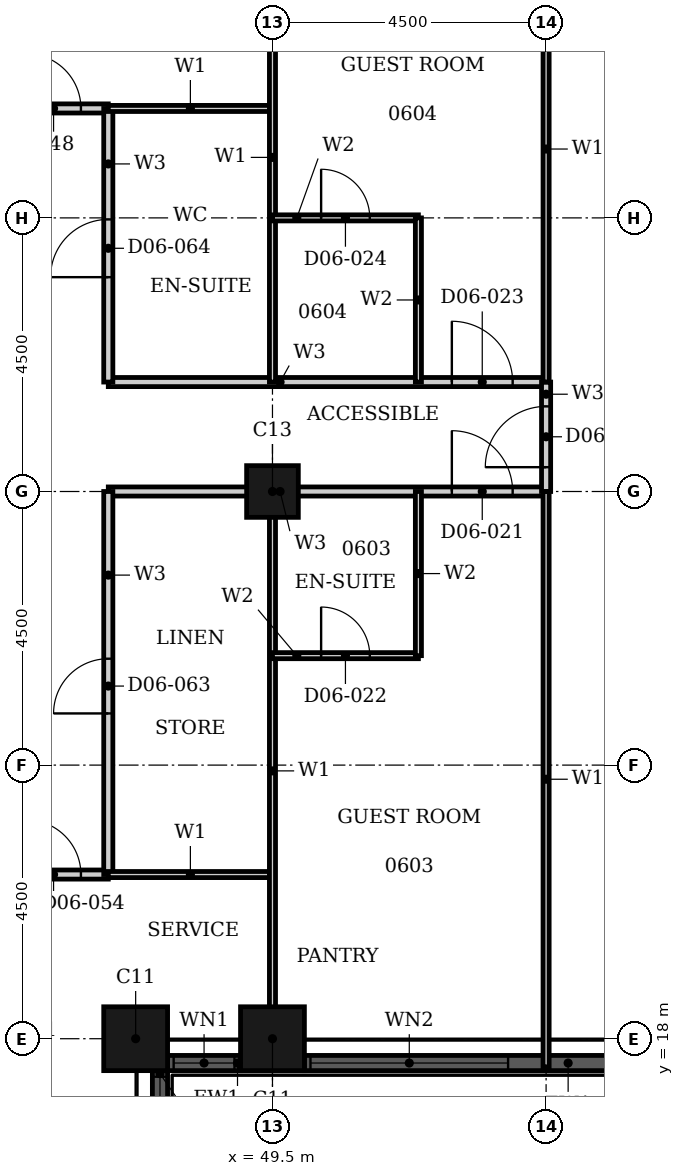
"""IFC4 building model, lengths in metres.
Left out: names, types, materials, properties, quantities, classifications, styles, units other than length and angle.
Written with IfcOpenShell. Run it as: python <this file> out.ifc"""

import sys

from ifc_helpers import new_model, si_unit, direction, frame, frame_2d, origin, origin_2d, place, context, subcontext, project, spatial, rectangle, hollow_rectangle, extrude, element, fill, save


model = new_model("IFC4")
c1 = context("Model", 3, precision=1e-05, world=origin(), true_north=direction((0.0, 1.0)))
c2 = subcontext(c1, "Body", "Model", "MODEL_VIEW")
j1 = project(units=[si_unit("LENGTHUNIT", "METRE"), si_unit("PLANEANGLEUNIT", "RADIAN")], contexts=[c1])
p1 = place(None, origin())
s1 = spatial("IfcSite", under=j1, at=p1, CompositionType="ELEMENT")
p2 = place(p1, origin())
s2 = spatial("IfcBuilding", under=s1, at=p2, CompositionType="ELEMENT")
p3 = place(p2, frame((0.0, 0.0, 33.6)))
s3 = spatial("IfcBuildingStorey", under=s2, at=p3, CompositionType="ELEMENT", Elevation=33.6)
for number, where, z_axis, x_axis in (
    (1, (47.25, 18.0, 0.0), (0.0, 0.0, 1.0), (1.0, 0.0, 0.0)),
    (2, (49.5, 18.0, 0.0), (0.0, 0.0, 1.0), (1.0, 0.0, 0.0)),
):
    element("IfcColumn", number, at=place(p3, frame(where, z_axis=z_axis, x_axis=x_axis)), inside=s3, PredefinedType="COLUMN", context=c2, shape_type="SweptSolid", body=[
        extrude(hollow_rectangle(XDim=1.05, YDim=1.05, WallThickness=0.034, at=origin_2d()), origin(), (0.0, 0.0, 1.0), 3.6),
    ])
p4 = place(p3, frame((49.5, 27.0, 0.0), z_axis=(0.0, 0.0, 1.0), x_axis=(1.0, 0.0, 0.0)))
e3 = element("IfcColumn", 3, at=p4, inside=s3, PredefinedType="COLUMN", context=c2, shape_type="SweptSolid", body=[
    extrude(hollow_rectangle(XDim=0.85, YDim=0.85, WallThickness=0.026, at=origin_2d()), origin(), (0.0, 0.0, 1.0), 3.6),
])
p5 = place(p3, frame((47.65, 16.275, 0.0), z_axis=(0.0, 0.0, 1.0), x_axis=(0.0, 1.0, 0.0)))
e4 = element("IfcWall", 4, at=p5, inside=s3, PredefinedType="SOLIDWALL", context=c2, shape_type="SweptSolid", body=[
    extrude(rectangle(XDim=1.2, YDim=0.25, at=frame_2d((0.6, 0.0))), origin(), (0.0, 0.0, 1.0), 3.6),
])
p6 = place(p5, frame((0.1, 0.0, 0.9)))
e5 = element("IfcOpeningElement", 5, at=p6, cuts=e4, PredefinedType="OPENING", context=c2, shape_type="SweptSolid", body=[
    extrude(rectangle(XDim=1.0, YDim=2.08, at=frame_2d((0.5, 1.04))), frame((0.0, 0.135, 0.0), z_axis=(0.0, -1.0, 0.0), x_axis=(1.0, 0.0, 0.0)), (0.0, 0.0, 1.0), 0.27),
])
p7 = place(p3, frame((47.775, 17.6, 0.0), z_axis=(0.0, 0.0, 1.0), x_axis=(1.0, 0.0, 0.0)))
e6 = element("IfcWall", 6, at=p7, inside=s3, PredefinedType="SOLIDWALL", context=c2, shape_type="SweptSolid", body=[
    extrude(rectangle(XDim=1.2, YDim=0.25, at=frame_2d((0.6, 0.0))), origin(), (0.0, 0.0, 1.0), 3.6),
])
p8 = place(p7, frame((0.1, 0.0, 0.9)))
e7 = element("IfcOpeningElement", 7, at=p8, cuts=e6, PredefinedType="OPENING", context=c2, shape_type="SweptSolid", body=[
    extrude(rectangle(XDim=1.0, YDim=2.08, at=frame_2d((0.5, 1.04))), frame((0.0, 0.135, 0.0), z_axis=(0.0, -1.0, 0.0), x_axis=(1.0, 0.0, 0.0)), (0.0, 0.0, 1.0), 0.27),
])
p9 = place(p3, frame((50.025, 17.6, 0.0), z_axis=(0.0, 0.0, 1.0), x_axis=(1.0, 0.0, 0.0)))
e8 = element("IfcWall", 8, at=p9, inside=s3, PredefinedType="SOLIDWALL", context=c2, shape_type="SweptSolid", body=[
    extrude(rectangle(XDim=7.95, YDim=0.25, at=frame_2d((3.975, 0.0))), origin(), (0.0, 0.0, 1.0), 3.6),
])
p10 = place(p9, frame((0.1, 0.0, 0.9)))
e9 = element("IfcOpeningElement", 9, at=p10, cuts=e8, PredefinedType="OPENING", context=c2, shape_type="SweptSolid", body=[
    extrude(rectangle(XDim=3.25, YDim=2.08, at=frame_2d((1.625, 1.04))), frame((0.0, 0.135, 0.0), z_axis=(0.0, -1.0, 0.0), x_axis=(1.0, 0.0, 0.0)), (0.0, 0.0, 1.0), 0.27),
])
p11 = place(p9, frame((5.325, 0.0, 0.0)))
e10 = element("IfcOpeningElement", 10, at=p11, cuts=e8, PredefinedType="OPENING", context=c2, shape_type="SweptSolid", body=[
    extrude(rectangle(XDim=1.8, YDim=2.4, at=frame_2d((0.9, 1.2))), frame((0.0, 0.135, 0.0), z_axis=(0.0, -1.0, 0.0), x_axis=(1.0, 0.0, 0.0)), (0.0, 0.0, 1.0), 0.27),
])
p12 = place(p3, frame((31.5, 20.7, 0.0), z_axis=(0.0, 0.0, 1.0), x_axis=(1.0, 0.0, 0.0)))
e11 = element("IfcWall", 11, at=p12, inside=s3, PredefinedType="PARTITIONING", context=c2, shape_type="SweptSolid", body=[
    extrude(rectangle(XDim=15.3, YDim=0.15, at=frame_2d((7.65, 0.0))), origin(), (0.0, 0.0, 1.0), 3.3),
])
p13 = place(p12, frame((11.95, 0.0, 0.0)))
e12 = element("IfcOpeningElement", 12, at=p13, cuts=e11, PredefinedType="OPENING", context=c2, shape_type="SweptSolid", body=[
    extrude(rectangle(XDim=1.0, YDim=2.1, at=frame_2d((0.5, 1.05))), frame((0.0, 0.085, 0.0), z_axis=(0.0, -1.0, 0.0), x_axis=(1.0, 0.0, 0.0)), (0.0, 0.0, 1.0), 0.17),
])
p14 = place(p12, frame((13.95, 0.0, 0.0)))
e13 = element("IfcOpeningElement", 13, at=p14, cuts=e11, PredefinedType="OPENING", context=c2, shape_type="SweptSolid", body=[
    extrude(rectangle(XDim=0.9, YDim=2.1, at=frame_2d((0.45, 1.05))), frame((0.0, 0.085, 0.0), z_axis=(0.0, -1.0, 0.0), x_axis=(1.0, 0.0, 0.0)), (0.0, 0.0, 1.0), 0.17),
])
p15 = place(p12, frame((4.05, 0.0, 0.0)))
e14 = element("IfcOpeningElement", 14, at=p15, cuts=e11, PredefinedType="OPENING", context=c2, shape_type="SweptSolid", body=[
    extrude(rectangle(XDim=0.9, YDim=2.1, at=frame_2d((0.45, 1.05))), frame((0.0, 0.085, 0.0), z_axis=(0.0, -1.0, 0.0), x_axis=(1.0, 0.0, 0.0)), (0.0, 0.0, 1.0), 0.17),
])
p16 = place(p3, frame((46.8, 27.0, 0.0), z_axis=(0.0, 0.0, 1.0), x_axis=(1.0, 0.0, 0.0)))
e15 = element("IfcWall", 15, at=p16, inside=s3, PredefinedType="PARTITIONING", context=c2, shape_type="SweptSolid", body=[
    extrude(rectangle(XDim=7.2, YDim=0.15, at=frame_2d((3.6, 0.0))), origin(), (0.0, 0.0, 1.0), 2.58),
])
p17 = place(p16, frame((5.65, 0.0, 0.0)))
e16 = element("IfcOpeningElement", 16, at=p17, cuts=e15, PredefinedType="OPENING", context=c2, shape_type="SweptSolid", body=[
    extrude(rectangle(XDim=1.0, YDim=2.1, at=frame_2d((0.5, 1.05))), frame((0.0, 0.085, 0.0), z_axis=(0.0, -1.0, 0.0), x_axis=(1.0, 0.0, 0.0)), (0.0, 0.0, 1.0), 0.17),
])
p18 = place(p3, frame((46.8, 28.8, 0.0), z_axis=(0.0, 0.0, 1.0), x_axis=(1.0, 0.0, 0.0)))
e17 = element("IfcWall", 17, at=p18, inside=s3, PredefinedType="PARTITIONING", context=c2, shape_type="SweptSolid", body=[
    extrude(rectangle(XDim=7.2, YDim=0.15, at=frame_2d((3.6, 0.0))), origin(), (0.0, 0.0, 1.0), 3.3),
])
p19 = place(p18, frame((5.65, 0.0, 0.0)))
e18 = element("IfcOpeningElement", 18, at=p19, cuts=e17, PredefinedType="OPENING", context=c2, shape_type="SweptSolid", body=[
    extrude(rectangle(XDim=1.0, YDim=2.1, at=frame_2d((0.5, 1.05))), frame((0.0, 0.085, 0.0), z_axis=(0.0, -1.0, 0.0), x_axis=(1.0, 0.0, 0.0)), (0.0, 0.0, 1.0), 0.17),
])
p20 = place(p3, frame((33.3, 33.3, 0.0), z_axis=(0.0, 0.0, 1.0), x_axis=(1.0, 0.0, 0.0)))
e19 = element("IfcWall", 19, at=p20, inside=s3, PredefinedType="PARTITIONING", context=c2, shape_type="SweptSolid", body=[
    extrude(rectangle(XDim=13.5, YDim=0.15, at=frame_2d((6.75, 0.0))), origin(), (0.0, 0.0, 1.0), 3.3),
])
p21 = place(p20, frame((10.15, 0.0, 0.0)))
e20 = element("IfcOpeningElement", 20, at=p21, cuts=e19, PredefinedType="OPENING", context=c2, shape_type="SweptSolid", body=[
    extrude(rectangle(XDim=1.0, YDim=2.1, at=frame_2d((0.5, 1.05))), frame((0.0, 0.085, 0.0), z_axis=(0.0, -1.0, 0.0), x_axis=(1.0, 0.0, 0.0)), (0.0, 0.0, 1.0), 0.17),
])
p22 = place(p20, frame((12.15, 0.0, 0.0)))
e21 = element("IfcOpeningElement", 21, at=p22, cuts=e19, PredefinedType="OPENING", context=c2, shape_type="SweptSolid", body=[
    extrude(rectangle(XDim=0.9, YDim=2.1, at=frame_2d((0.45, 1.05))), frame((0.0, 0.085, 0.0), z_axis=(0.0, -1.0, 0.0), x_axis=(1.0, 0.0, 0.0)), (0.0, 0.0, 1.0), 0.17),
])
p23 = place(p20, frame((0.75, 0.0, 0.0)))
e22 = element("IfcOpeningElement", 22, at=p23, cuts=e19, PredefinedType="OPENING", context=c2, shape_type="SweptSolid", body=[
    extrude(rectangle(XDim=0.9, YDim=2.1, at=frame_2d((0.45, 1.05))), frame((0.0, 0.085, 0.0), z_axis=(0.0, -1.0, 0.0), x_axis=(1.0, 0.0, 0.0)), (0.0, 0.0, 1.0), 0.17),
])
p24 = place(p20, frame((4.35, 0.0, 0.0)))
e23 = element("IfcOpeningElement", 23, at=p24, cuts=e19, PredefinedType="OPENING", context=c2, shape_type="SweptSolid", body=[
    extrude(rectangle(XDim=0.9, YDim=2.1, at=frame_2d((0.45, 1.05))), frame((0.0, 0.085, 0.0), z_axis=(0.0, -1.0, 0.0), x_axis=(1.0, 0.0, 0.0)), (0.0, 0.0, 1.0), 0.17),
])
p25 = place(p3, frame((46.8, 28.8, 0.0), z_axis=(0.0, 0.0, 1.0), x_axis=(0.0, 1.0, 0.0)))
e24 = element("IfcWall", 24, at=p25, inside=s3, PredefinedType="PARTITIONING", context=c2, shape_type="SweptSolid", body=[
    extrude(rectangle(XDim=4.5, YDim=0.15, at=frame_2d((2.25, 0.0))), origin(), (0.0, 0.0, 1.0), 3.3),
])
p26 = place(p25, frame((1.725, 0.0, 0.0)))
e25 = element("IfcOpeningElement", 25, at=p26, cuts=e24, PredefinedType="OPENING", context=c2, shape_type="SweptSolid", body=[
    extrude(rectangle(XDim=0.95, YDim=2.1, at=frame_2d((0.475, 1.05))), frame((0.0, 0.085, 0.0), z_axis=(0.0, -1.0, 0.0), x_axis=(1.0, 0.0, 0.0)), (0.0, 0.0, 1.0), 0.17),
])
p27 = place(p3, frame((46.8, 20.7, 0.0), z_axis=(0.0, 0.0, 1.0), x_axis=(0.0, 1.0, 0.0)))
e26 = element("IfcWall", 26, at=p27, inside=s3, PredefinedType="PARTITIONING", context=c2, shape_type="SweptSolid", body=[
    extrude(rectangle(XDim=6.3, YDim=0.15, at=frame_2d((3.15, 0.0))), origin(), (0.0, 0.0, 1.0), 3.3),
])
p28 = place(p27, frame((2.65, 0.0, 0.0)))
e27 = element("IfcOpeningElement", 27, at=p28, cuts=e26, PredefinedType="OPENING", context=c2, shape_type="SweptSolid", body=[
    extrude(rectangle(XDim=0.9, YDim=2.1, at=frame_2d((0.45, 1.05))), frame((0.0, 0.085, 0.0), z_axis=(0.0, -1.0, 0.0), x_axis=(1.0, 0.0, 0.0)), (0.0, 0.0, 1.0), 0.17),
])
p29 = place(p3, frame((54.0, 27.0, 0.0), z_axis=(0.0, 0.0, 1.0), x_axis=(0.0, 1.0, 0.0)))
e28 = element("IfcWall", 28, at=p29, inside=s3, PredefinedType="PARTITIONING", context=c2, shape_type="SweptSolid", body=[
    extrude(rectangle(XDim=1.8, YDim=0.15, at=frame_2d((0.9, 0.0))), origin(), (0.0, 0.0, 1.0), 3.3),
])
p30 = place(p29, frame((0.4, 0.0, 0.0)))
e29 = element("IfcOpeningElement", 29, at=p30, cuts=e28, PredefinedType="OPENING", context=c2, shape_type="SweptSolid", body=[
    extrude(rectangle(XDim=1.0, YDim=2.1, at=frame_2d((0.5, 1.05))), frame((0.0, 0.085, 0.0), z_axis=(0.0, -1.0, 0.0), x_axis=(1.0, 0.0, 0.0)), (0.0, 0.0, 1.0), 0.17),
])
for number, where, z_axis, x_axis in (
    (30, (46.8, 20.7, 0.0), (0.0, 0.0, 1.0), (1.0, 0.0, 0.0)),
    (31, (46.8, 33.3, 0.0), (0.0, 0.0, 1.0), (1.0, 0.0, 0.0)),
):
    element("IfcWall", number, at=place(p3, frame(where, z_axis=z_axis, x_axis=x_axis)), inside=s3, PredefinedType="PARTITIONING", context=c2, shape_type="SweptSolid", body=[
        extrude(rectangle(XDim=2.7, YDim=0.1, at=frame_2d((1.35, 0.0))), origin(), (0.0, 0.0, 1.0), 3.3),
    ])
p31 = place(p3, frame((49.5, 28.8, 0.0), z_axis=(0.0, 0.0, 1.0), x_axis=(0.0, 1.0, 0.0)))
e32 = element("IfcWall", 32, at=p31, inside=s3, PredefinedType="PARTITIONING", context=c2, shape_type="SweptSolid", body=[
    extrude(rectangle(XDim=7.39, YDim=0.1, at=frame_2d((3.695, 0.0))), origin(), (0.0, 0.0, 1.0), 2.38),
])
p32 = place(p3, frame((49.5, 17.81, 0.0), z_axis=(0.0, 0.0, 1.0), x_axis=(0.0, 1.0, 0.0)))
e33 = element("IfcWall", 33, at=p32, inside=s3, PredefinedType="PARTITIONING", context=c2, shape_type="SweptSolid", body=[
    extrude(rectangle(XDim=9.19, YDim=0.1, at=frame_2d((4.595, 0.0))), origin(), (0.0, 0.0, 1.0), 2.38),
])
p33 = place(p3, frame((54.0, 28.8, 0.0), z_axis=(0.0, 0.0, 1.0), x_axis=(0.0, 1.0, 0.0)))
e34 = element("IfcWall", 34, at=p33, inside=s3, PredefinedType="PARTITIONING", context=c2, shape_type="SweptSolid", body=[
    extrude(rectangle(XDim=7.665, YDim=0.1, at=frame_2d((3.833, 0.0))), origin(), (0.0, 0.0, 1.0), 3.3),
])
p34 = place(p3, frame((54.0, 17.535, 0.0), z_axis=(0.0, 0.0, 1.0), x_axis=(0.0, 1.0, 0.0)))
e35 = element("IfcWall", 35, at=p34, inside=s3, PredefinedType="PARTITIONING", context=c2, shape_type="SweptSolid", body=[
    extrude(rectangle(XDim=9.465, YDim=0.1, at=frame_2d((4.732, 0.0))), origin(), (0.0, 0.0, 1.0), 3.3),
])
p35 = place(p3, frame((49.5, 24.3, 0.0), z_axis=(0.0, 0.0, 1.0), x_axis=(1.0, 0.0, 0.0)))
e36 = element("IfcWall", 36, at=p35, inside=s3, PredefinedType="PARTITIONING", context=c2, shape_type="SweptSolid", body=[
    extrude(rectangle(XDim=2.4, YDim=0.1, at=frame_2d((1.2, 0.0))), origin(), (0.0, 0.0, 1.0), 3.3),
])
p36 = place(p35, frame((0.8, 0.0, 0.0)))
e37 = element("IfcOpeningElement", 37, at=p36, cuts=e36, PredefinedType="OPENING", context=c2, shape_type="SweptSolid", body=[
    extrude(rectangle(XDim=0.8, YDim=2.1, at=frame_2d((0.4, 1.05))), frame((0.0, 0.06, 0.0), z_axis=(0.0, -1.0, 0.0), x_axis=(1.0, 0.0, 0.0)), (0.0, 0.0, 1.0), 0.12),
])
p37 = place(p3, frame((49.5, 31.5, 0.0), z_axis=(0.0, 0.0, 1.0), x_axis=(1.0, 0.0, 0.0)))
e38 = element("IfcWall", 38, at=p37, inside=s3, PredefinedType="PARTITIONING", context=c2, shape_type="SweptSolid", body=[
    extrude(rectangle(XDim=2.4, YDim=0.1, at=frame_2d((1.2, 0.0))), origin(), (0.0, 0.0, 1.0), 2.58),
])
p38 = place(p37, frame((0.8, 0.0, 0.0)))
e39 = element("IfcOpeningElement", 39, at=p38, cuts=e38, PredefinedType="OPENING", context=c2, shape_type="SweptSolid", body=[
    extrude(rectangle(XDim=0.8, YDim=2.1, at=frame_2d((0.4, 1.05))), frame((0.0, 0.06, 0.0), z_axis=(0.0, -1.0, 0.0), x_axis=(1.0, 0.0, 0.0)), (0.0, 0.0, 1.0), 0.12),
])
for number, where, z_axis, x_axis in (
    (40, (51.9, 28.8, 0.0), (0.0, 0.0, 1.0), (0.0, 1.0, 0.0)),
    (41, (51.9, 24.3, 0.0), (0.0, 0.0, 1.0), (0.0, 1.0, 0.0)),
):
    element("IfcWall", number, at=place(p3, frame(where, z_axis=z_axis, x_axis=x_axis)), inside=s3, PredefinedType="PARTITIONING", context=c2, shape_type="SweptSolid", body=[
        extrude(rectangle(XDim=2.7, YDim=0.1, at=frame_2d((1.35, 0.0))), origin(), (0.0, 0.0, 1.0), 3.3),
    ])
p39 = place(p6, origin())
e42 = element("IfcWindow", 42, at=p39, inside=s3, PartitioningType="SINGLE_PANEL", PredefinedType="WINDOW", context=c2, shape_type="SweptSolid", body=[
    extrude(rectangle(XDim=1.0, YDim=2.08, at=frame_2d((0.5, 1.04))), frame((0.0, 0.03, 0.0), z_axis=(0.0, -1.0, 0.0), x_axis=(1.0, 0.0, 0.0)), (0.0, 0.0, 1.0), 0.06),
])
fill(e5, e42)
p40 = place(p8, origin())
e43 = element("IfcWindow", 43, at=p40, inside=s3, PartitioningType="SINGLE_PANEL", PredefinedType="WINDOW", context=c2, shape_type="SweptSolid", body=[
    extrude(rectangle(XDim=1.0, YDim=2.08, at=frame_2d((0.5, 1.04))), frame((0.0, 0.03, 0.0), z_axis=(0.0, -1.0, 0.0), x_axis=(1.0, 0.0, 0.0)), (0.0, 0.0, 1.0), 0.06),
])
fill(e7, e43)
p41 = place(p10, origin())
e44 = element("IfcWindow", 44, at=p41, inside=s3, PartitioningType="SINGLE_PANEL", PredefinedType="WINDOW", context=c2, shape_type="SweptSolid", body=[
    extrude(rectangle(XDim=3.25, YDim=2.08, at=frame_2d((1.625, 1.04))), frame((0.0, 0.03, 0.0), z_axis=(0.0, -1.0, 0.0), x_axis=(1.0, 0.0, 0.0)), (0.0, 0.0, 1.0), 0.06),
])
fill(e9, e44)
p42 = place(p17, origin())
e45 = element("IfcDoor", 45, at=p42, inside=s3, OperationType="SINGLE_SWING_RIGHT", PredefinedType="DOOR", context=c2, shape_type="SweptSolid", body=[
    extrude(rectangle(XDim=1.0, YDim=2.1, at=frame_2d((0.5, 1.05))), frame((0.0, 0.025, 0.0), z_axis=(0.0, -1.0, 0.0), x_axis=(1.0, 0.0, 0.0)), (0.0, 0.0, 1.0), 0.05),
])
fill(e16, e45)
p43 = place(p36, origin())
e46 = element("IfcDoor", 46, at=p43, inside=s3, OperationType="SINGLE_SWING_LEFT", PredefinedType="DOOR", context=c2, shape_type="SweptSolid", body=[
    extrude(rectangle(XDim=0.8, YDim=2.1, at=frame_2d((0.4, 1.05))), frame((0.0, 0.025, 0.0), z_axis=(0.0, -1.0, 0.0), x_axis=(1.0, 0.0, 0.0)), (0.0, 0.0, 1.0), 0.05),
])
fill(e37, e46)
p44 = place(p19, origin())
e47 = element("IfcDoor", 47, at=p44, inside=s3, OperationType="SINGLE_SWING_RIGHT", PredefinedType="DOOR", context=c2, shape_type="SweptSolid", body=[
    extrude(rectangle(XDim=1.0, YDim=2.1, at=frame_2d((0.5, 1.05))), frame((0.0, 0.025, 0.0), z_axis=(0.0, -1.0, 0.0), x_axis=(1.0, 0.0, 0.0)), (0.0, 0.0, 1.0), 0.05),
])
fill(e18, e47)
p45 = place(p38, origin())
e48 = element("IfcDoor", 48, at=p45, inside=s3, OperationType="SINGLE_SWING_RIGHT", PredefinedType="DOOR", context=c2, shape_type="SweptSolid", body=[
    extrude(rectangle(XDim=0.8, YDim=2.1, at=frame_2d((0.4, 1.05))), frame((0.0, 0.025, 0.0), z_axis=(0.0, -1.0, 0.0), x_axis=(1.0, 0.0, 0.0)), (0.0, 0.0, 1.0), 0.05),
])
fill(e39, e48)
p46 = place(p30, origin())
e49 = element("IfcDoor", 49, at=p46, inside=s3, OperationType="SINGLE_SWING_LEFT", PredefinedType="DOOR", context=c2, shape_type="SweptSolid", body=[
    extrude(rectangle(XDim=1.0, YDim=2.1, at=frame_2d((0.5, 1.05))), frame((0.0, 0.025, 0.0), z_axis=(0.0, -1.0, 0.0), x_axis=(1.0, 0.0, 0.0)), (0.0, 0.0, 1.0), 0.05),
])
fill(e29, e49)
p47 = place(p22, origin())
e50 = element("IfcDoor", 50, at=p47, inside=s3, OperationType="SINGLE_SWING_LEFT", PredefinedType="DOOR", context=c2, shape_type="SweptSolid", body=[
    extrude(rectangle(XDim=0.9, YDim=2.1, at=frame_2d((0.45, 1.05))), frame((0.0, 0.025, 0.0), z_axis=(0.0, -1.0, 0.0), x_axis=(1.0, 0.0, 0.0)), (0.0, 0.0, 1.0), 0.05),
])
fill(e21, e50)
p48 = place(p14, origin())
e51 = element("IfcDoor", 51, at=p48, inside=s3, OperationType="SINGLE_SWING_RIGHT", PredefinedType="DOOR", context=c2, shape_type="SweptSolid", body=[
    extrude(rectangle(XDim=0.9, YDim=2.1, at=frame_2d((0.45, 1.05))), frame((0.0, 0.025, 0.0), z_axis=(0.0, -1.0, 0.0), x_axis=(1.0, 0.0, 0.0)), (0.0, 0.0, 1.0), 0.05),
])
fill(e13, e51)
p49 = place(p28, origin())
e52 = element("IfcDoor", 52, at=p49, inside=s3, OperationType="SINGLE_SWING_RIGHT", PredefinedType="DOOR", context=c2, shape_type="SweptSolid", body=[
    extrude(rectangle(XDim=0.9, YDim=2.1, at=frame_2d((0.45, 1.05))), frame((0.0, 0.025, 0.0), z_axis=(0.0, -1.0, 0.0), x_axis=(1.0, 0.0, 0.0)), (0.0, 0.0, 1.0), 0.05),
])
fill(e27, e52)
p50 = place(p26, origin())
e53 = element("IfcDoor", 53, at=p50, inside=s3, OperationType="SINGLE_SWING_RIGHT", PredefinedType="DOOR", context=c2, shape_type="SweptSolid", body=[
    extrude(rectangle(XDim=0.95, YDim=2.1, at=frame_2d((0.475, 1.05))), frame((0.0, 0.025, 0.0), z_axis=(0.0, -1.0, 0.0), x_axis=(1.0, 0.0, 0.0)), (0.0, 0.0, 1.0), 0.05),
])
fill(e25, e53)
save(model, sys.argv[1])
